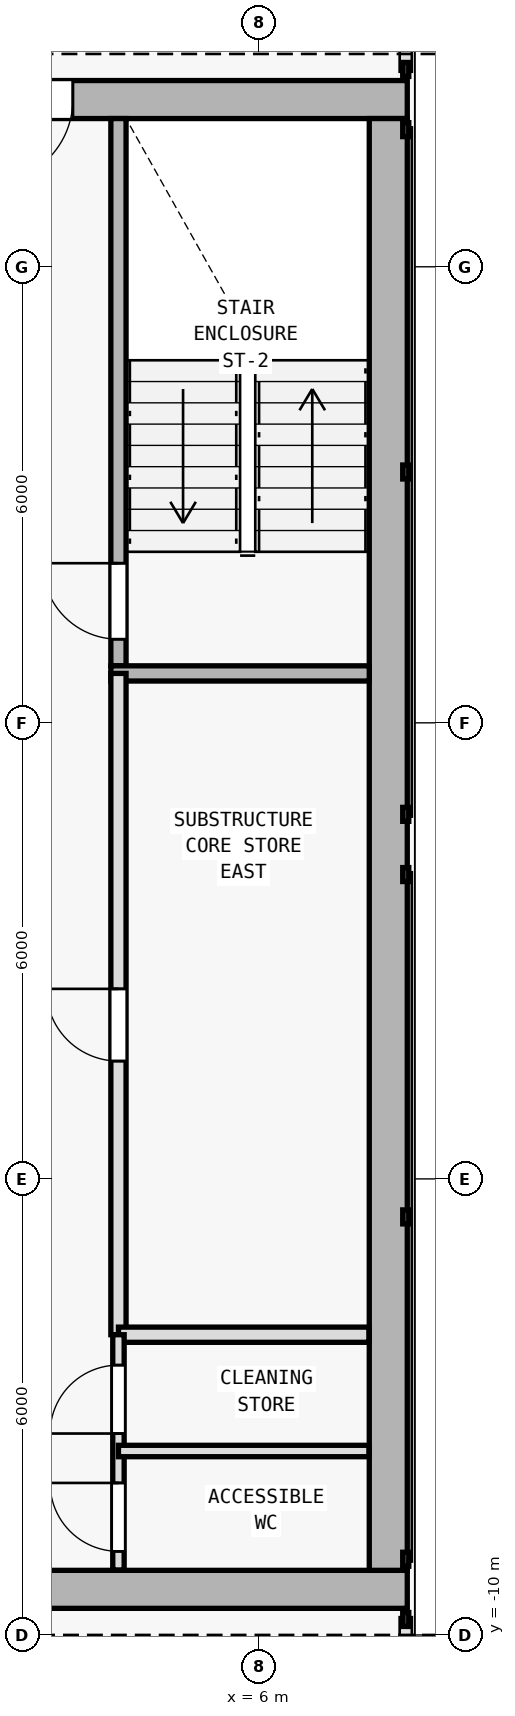
"""IFC4 building model, lengths in metres.
Left out: names, types, materials, properties, quantities, classifications, styles, units other than length and angle.
Written with IfcOpenShell. Run it as: python <this file> out.ifc"""

import sys

from ifc_helpers import new_model, si_unit, direction, frame, frame_2d, origin, origin_2d, place, context, subcontext, project, spatial, rectangle, i_section, extrude, element, fill, save


model = new_model("IFC4")
c1 = context("Model", 3, precision=1e-05, world=origin(), true_north=direction((0.0, 1.0)))
c2 = subcontext(c1, "Body", "Model", "MODEL_VIEW")
j1 = project(units=[si_unit("LENGTHUNIT", "METRE"), si_unit("PLANEANGLEUNIT", "RADIAN")], contexts=[c1])
p1 = place(None, origin())
s1 = spatial("IfcSite", under=j1, at=p1, CompositionType="ELEMENT")
p2 = place(p1, origin())
s2 = spatial("IfcBuilding", under=s1, at=p2, CompositionType="ELEMENT")
p3 = place(p2, frame((0.0, 0.0, 312.0)))
s3 = spatial("IfcBuildingStorey", under=s2, at=p3, CompositionType="ELEMENT", Elevation=312.0)
for number, where, z_axis, x_axis in (
    (1, (7.7, -9.4, 0.0), (0.0, 0.0, 1.0), (1.0, 0.0, 0.0)),
    (2, (7.7, 10.2, 0.0), (0.0, 0.0, 1.0), (1.0, 0.0, 0.0)),
    (3, (7.7, 0.4, 0.0), (0.0, 0.0, 1.0), (1.0, 0.0, 0.0)),
):
    element("IfcColumn", number, at=place(p3, frame(where, z_axis=z_axis, x_axis=x_axis)), inside=s3, PredefinedType="COLUMN", context=c2, shape_type="SweptSolid", body=[
        extrude(i_section(OverallWidth=0.374, OverallDepth=0.372, WebThickness=0.012, FlangeThickness=0.02, FilletRadius=0.015, at=origin_2d()), origin(), (0.0, 0.0, 1.0), 3.6),
    ])
p4 = place(p3, frame((-7.95, -9.4, 0.0), z_axis=(0.0, 0.0, 1.0), x_axis=(1.0, 0.0, 0.0)))
e4 = element("IfcWall", 4, at=p4, inside=s3, PredefinedType="SHEAR", context=c2, shape_type="SweptSolid", body=[
    extrude(rectangle(XDim=15.9, YDim=0.5, at=frame_2d((7.95, 0.0))), origin(), (0.0, 0.0, 1.0), 3.34),
])
p5 = place(p4, frame((9.6, 0.0, 0.0)))
e5 = element("IfcOpeningElement", 5, at=p5, cuts=e4, PredefinedType="OPENING", context=c2, shape_type="SweptSolid", body=[
    extrude(rectangle(XDim=1.5, YDim=2.2, at=frame_2d((0.75, 1.1))), frame((0.0, 0.26, 0.0), z_axis=(0.0, -1.0, 0.0), x_axis=(1.0, 0.0, 0.0)), (0.0, 0.0, 1.0), 0.52),
])
p6 = place(p3, frame((7.95, 10.2, 0.0), z_axis=(0.0, 0.0, 1.0), x_axis=(-1.0, 0.0, 0.0)))
e6 = element("IfcWall", 6, at=p6, inside=s3, PredefinedType="SHEAR", context=c2, shape_type="SweptSolid", body=[
    extrude(rectangle(XDim=15.9, YDim=0.5, at=frame_2d((7.95, 0.0))), origin(), (0.0, 0.0, 1.0), 3.34),
])
p7 = place(p6, frame((4.4, 0.0, 0.0)))
e7 = element("IfcOpeningElement", 7, at=p7, cuts=e6, PredefinedType="OPENING", context=c2, shape_type="SweptSolid", body=[
    extrude(rectangle(XDim=1.1, YDim=2.15, at=frame_2d((0.55, 1.075))), frame((0.0, 0.26, 0.0), z_axis=(0.0, -1.0, 0.0), x_axis=(1.0, 0.0, 0.0)), (0.0, 0.0, 1.0), 0.52),
])
p8 = place(p3, frame((7.7, 9.95, 0.0), z_axis=(0.0, 0.0, 1.0), x_axis=(0.0, -1.0, 0.0)))
e8 = element("IfcWall", 8, at=p8, inside=s3, PredefinedType="SHEAR", context=c2, shape_type="SweptSolid", body=[
    extrude(rectangle(XDim=19.1, YDim=0.5, at=frame_2d((9.55, 0.0))), origin(), (0.0, 0.0, 1.0), 3.34),
])
p9 = place(p3, frame((4.15, 2.75, 0.0), z_axis=(0.0, 0.0, 1.0), x_axis=(0.0, 1.0, 0.0)))
e9 = element("IfcWall", 9, at=p9, inside=s3, PredefinedType="SOLIDWALL", context=c2, shape_type="SweptSolid", body=[
    extrude(rectangle(XDim=7.2, YDim=0.2, at=frame_2d((3.6, 0.0))), origin(), (0.0, 0.0, 1.0), 3.34),
])
p10 = place(p9, frame((0.35, 0.0, 0.0)))
e10 = element("IfcOpeningElement", 10, at=p10, cuts=e9, PredefinedType="OPENING", context=c2, shape_type="SweptSolid", body=[
    extrude(rectangle(XDim=1.0, YDim=2.15, at=frame_2d((0.5, 1.075))), frame((0.0, 0.11, 0.0), z_axis=(0.0, -1.0, 0.0), x_axis=(1.0, 0.0, 0.0)), (0.0, 0.0, 1.0), 0.22),
])
p11 = place(p3, frame((4.05, 2.65, 0.0), z_axis=(0.0, 0.0, 1.0), x_axis=(1.0, 0.0, 0.0)))
e11 = element("IfcWall", 11, at=p11, inside=s3, PredefinedType="SOLIDWALL", context=c2, shape_type="SweptSolid", body=[
    extrude(rectangle(XDim=3.4, YDim=0.2, at=frame_2d((1.7, 0.0))), origin(), (0.0, 0.0, 1.0), 3.34),
])
p12 = place(p3, frame((4.15, -6.05, 0.0), z_axis=(0.0, 0.0, 1.0), x_axis=(0.0, 1.0, 0.0)))
e12 = element("IfcWall", 12, at=p12, inside=s3, PredefinedType="SOLIDWALL", context=c2, shape_type="SweptSolid", body=[
    extrude(rectangle(XDim=8.7, YDim=0.2, at=frame_2d((4.35, 0.0))), origin(), (0.0, 0.0, 1.0), 3.34),
])
p13 = place(p12, frame((3.6, 0.0, 0.0)))
e13 = element("IfcOpeningElement", 13, at=p13, cuts=e12, PredefinedType="OPENING", context=c2, shape_type="SweptSolid", body=[
    extrude(rectangle(XDim=0.95, YDim=2.1, at=frame_2d((0.475, 1.05))), frame((0.0, 0.11, 0.0), z_axis=(0.0, -1.0, 0.0), x_axis=(1.0, 0.0, 0.0)), (0.0, 0.0, 1.0), 0.22),
])
p14 = place(p3, frame((4.15, -6.05, 0.0), z_axis=(0.0, 0.0, 1.0), x_axis=(1.0, 0.0, 0.0)))
e14 = element("IfcWall", 14, at=p14, inside=s3, PredefinedType="SOLIDWALL", context=c2, shape_type="SweptSolid", body=[
    extrude(rectangle(XDim=3.295, YDim=0.2, at=frame_2d((1.647, 0.0))), origin(), (0.0, 0.0, 1.0), 3.34),
])
p15 = place(p3, frame((4.15, -9.145, 0.0), z_axis=(0.0, 0.0, 1.0), x_axis=(0.0, 1.0, 0.0)))
e15 = element("IfcWall", 15, at=p15, inside=s3, PredefinedType="PARTITIONING", context=c2, shape_type="SweptSolid", body=[
    extrude(rectangle(XDim=3.095, YDim=0.15, at=frame_2d((1.547, 0.0))), origin(), (0.0, 0.0, 1.0), 3.34),
])
p16 = place(p15, frame((0.245, 0.0, 0.0)))
e16 = element("IfcOpeningElement", 16, at=p16, cuts=e15, PredefinedType="OPENING", context=c2, shape_type="SweptSolid", body=[
    extrude(rectangle(XDim=0.9, YDim=2.1, at=frame_2d((0.45, 1.05))), frame((0.0, 0.085, 0.0), z_axis=(0.0, -1.0, 0.0), x_axis=(1.0, 0.0, 0.0)), (0.0, 0.0, 1.0), 0.17),
])
p17 = place(p15, frame((1.795, 0.0, 0.0)))
e17 = element("IfcOpeningElement", 17, at=p17, cuts=e15, PredefinedType="OPENING", context=c2, shape_type="SweptSolid", body=[
    extrude(rectangle(XDim=0.9, YDim=2.1, at=frame_2d((0.45, 1.05))), frame((0.0, 0.085, 0.0), z_axis=(0.0, -1.0, 0.0), x_axis=(1.0, 0.0, 0.0)), (0.0, 0.0, 1.0), 0.17),
])
p18 = place(p3, frame((4.15, -7.58, 0.0), z_axis=(0.0, 0.0, 1.0), x_axis=(1.0, 0.0, 0.0)))
e18 = element("IfcWall", 18, at=p18, inside=s3, PredefinedType="PARTITIONING", context=c2, shape_type="SweptSolid", body=[
    extrude(rectangle(XDim=3.295, YDim=0.15, at=frame_2d((1.647, 0.0))), origin(), (0.0, 0.0, 1.0), 3.34),
])
p19 = place(p7, origin())
e19 = element("IfcDoor", 19, at=p19, inside=s3, OperationType="SINGLE_SWING_RIGHT", PredefinedType="DOOR", context=c2, shape_type="SweptSolid", body=[
    extrude(rectangle(XDim=1.1, YDim=2.15, at=frame_2d((0.55, 1.075))), frame((0.0, 0.025, 0.0), z_axis=(0.0, -1.0, 0.0), x_axis=(1.0, 0.0, 0.0)), (0.0, 0.0, 1.0), 0.05),
])
fill(e7, e19)
p20 = place(p10, origin())
e20 = element("IfcDoor", 20, at=p20, inside=s3, OperationType="SINGLE_SWING_RIGHT", PredefinedType="DOOR", context=c2, shape_type="SweptSolid", body=[
    extrude(rectangle(XDim=1.0, YDim=2.15, at=frame_2d((0.5, 1.075))), frame((0.0, 0.025, 0.0), z_axis=(0.0, -1.0, 0.0), x_axis=(1.0, 0.0, 0.0)), (0.0, 0.0, 1.0), 0.05),
])
fill(e10, e20)
p21 = place(p13, origin())
e21 = element("IfcDoor", 21, at=p21, inside=s3, OperationType="SINGLE_SWING_RIGHT", PredefinedType="DOOR", context=c2, shape_type="SweptSolid", body=[
    extrude(rectangle(XDim=0.95, YDim=2.1, at=frame_2d((0.475, 1.05))), frame((0.0, 0.025, 0.0), z_axis=(0.0, -1.0, 0.0), x_axis=(1.0, 0.0, 0.0)), (0.0, 0.0, 1.0), 0.05),
])
fill(e13, e21)
p22 = place(p16, origin())
e22 = element("IfcDoor", 22, at=p22, inside=s3, OperationType="SINGLE_SWING_RIGHT", PredefinedType="DOOR", context=c2, shape_type="SweptSolid", body=[
    extrude(rectangle(XDim=0.9, YDim=2.1, at=frame_2d((0.45, 1.05))), frame((0.0, 0.025, 0.0), z_axis=(0.0, -1.0, 0.0), x_axis=(1.0, 0.0, 0.0)), (0.0, 0.0, 1.0), 0.05),
])
fill(e16, e22)
p23 = place(p17, origin())
e23 = element("IfcDoor", 23, at=p23, inside=s3, OperationType="SINGLE_SWING_LEFT", PredefinedType="DOOR", context=c2, shape_type="SweptSolid", body=[
    extrude(rectangle(XDim=0.9, YDim=2.1, at=frame_2d((0.45, 1.05))), frame((0.0, 0.025, 0.0), z_axis=(0.0, -1.0, 0.0), x_axis=(1.0, 0.0, 0.0)), (0.0, 0.0, 1.0), 0.05),
])
fill(e17, e23)
save(model, sys.argv[1])
